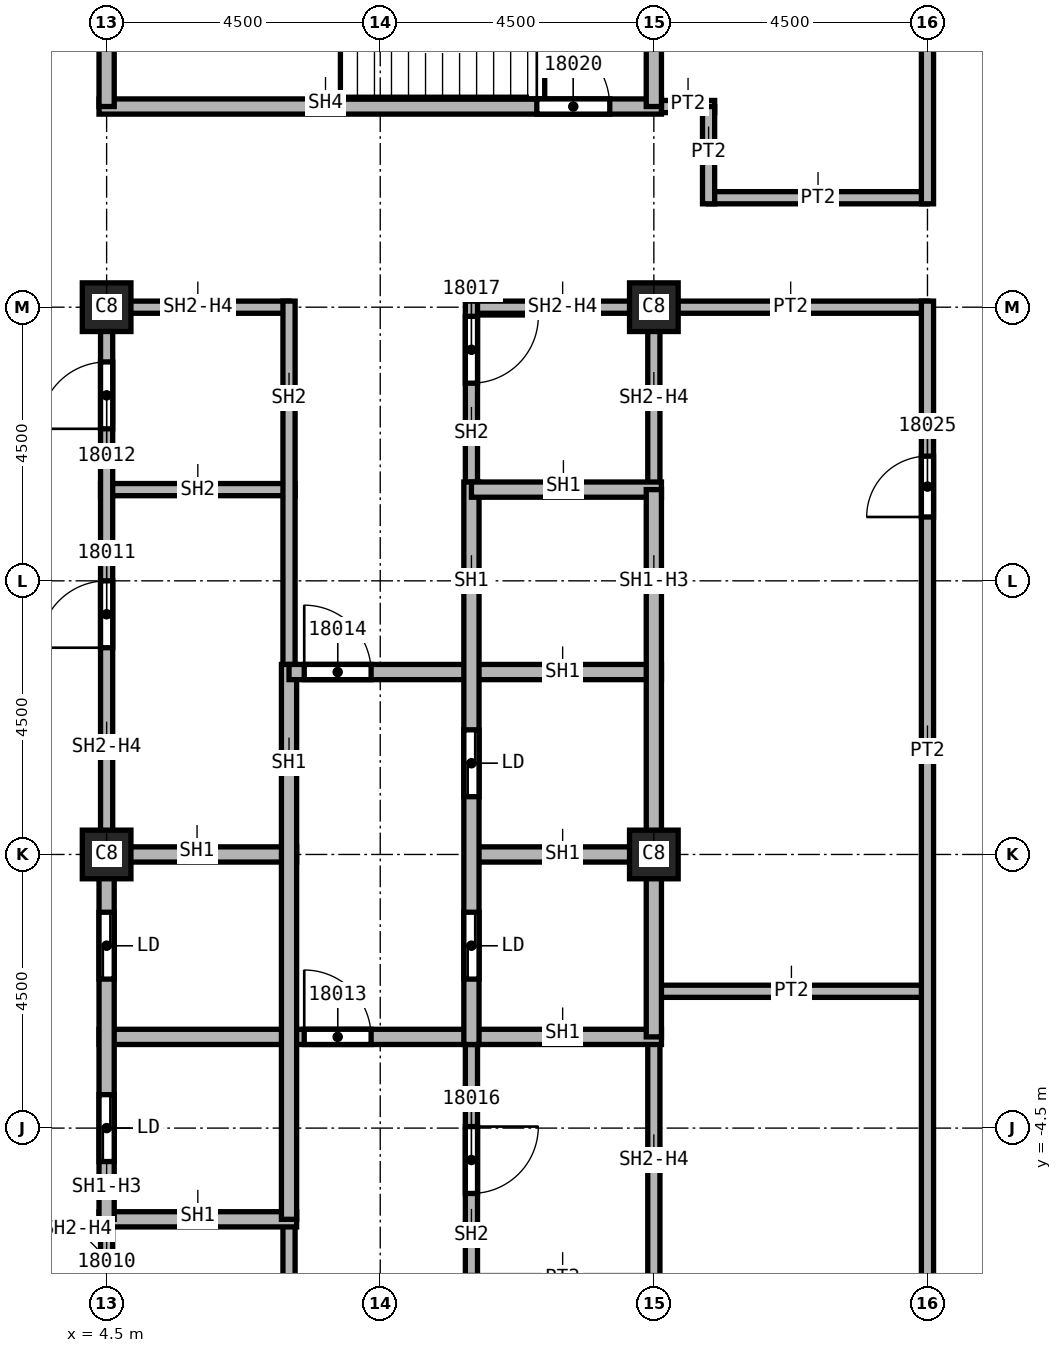
"""IFC4 building model, lengths in metres.
Left out: names, types, materials, properties, quantities, classifications, styles, units other than length and angle.
Written with IfcOpenShell. Run it as: python <this file> out.ifc"""

import sys

from ifc_helpers import new_model, si_unit, direction, frame, frame_2d, origin, origin_2d, place, context, subcontext, project, spatial, rectangle, extrude, element, fill, save


model = new_model("IFC4")
c1 = context("Model", 3, precision=1e-05, world=origin(), true_north=direction((0.0, 1.0)))
c2 = subcontext(c1, "Body", "Model", "MODEL_VIEW")
j1 = project(units=[si_unit("LENGTHUNIT", "METRE"), si_unit("PLANEANGLEUNIT", "RADIAN")], contexts=[c1])
p1 = place(None, origin())
s1 = spatial("IfcSite", under=j1, at=p1, CompositionType="ELEMENT")
p2 = place(p1, origin())
s2 = spatial("IfcBuilding", under=s1, at=p2, CompositionType="ELEMENT")
p3 = place(p2, frame((0.0, 0.0, 266.0)))
s3 = spatial("IfcBuildingStorey", under=s2, at=p3, CompositionType="ELEMENT", Elevation=266.0)
for number, where, z_axis, x_axis in (
    (1, (4.5, 0.0, 0.0), (0.0, 0.0, 1.0), (1.0, 0.0, 0.0)),
    (2, (4.5, 9.0, 0.0), (0.0, 0.0, 1.0), (1.0, 0.0, 0.0)),
    (3, (13.5, 0.0, 0.0), (0.0, 0.0, 1.0), (1.0, 0.0, 0.0)),
    (4, (13.5, 9.0, 0.0), (0.0, 0.0, 1.0), (1.0, 0.0, 0.0)),
):
    element("IfcColumn", number, at=place(p3, frame(where, z_axis=z_axis, x_axis=x_axis)), inside=s3, PredefinedType="COLUMN", context=c2, shape_type="SweptSolid", body=[
        extrude(rectangle(XDim=0.8, YDim=0.8, at=origin_2d()), origin(), (0.0, 0.0, 1.0), 3.72),
    ])
p4 = place(p3, frame((13.375, 12.3, 0.0), z_axis=(0.0, 0.0, 1.0), x_axis=(1.0, 0.0, 0.0)))
e5 = element("IfcWall", 5, at=p4, inside=s3, PredefinedType="PARTITIONING", context=c2, shape_type="SweptSolid", body=[
    extrude(rectangle(XDim=1.125, YDim=0.2, at=frame_2d((0.562, 0.0))), origin(), (0.0, 0.0, 1.0), 3.72),
])
for number, where, z_axis, x_axis in (
    (6, (13.5, -2.25, 0.0), (0.0, 0.0, 1.0), (1.0, 0.0, 0.0)),
    (7, (18.0, 9.0, 0.0), (0.0, 0.0, 1.0), (-1.0, 0.0, 0.0)),
):
    element("IfcWall", number, at=place(p3, frame(where, z_axis=z_axis, x_axis=x_axis)), inside=s3, PredefinedType="PARTITIONING", context=c2, shape_type="SweptSolid", body=[
        extrude(rectangle(XDim=4.5, YDim=0.2, at=frame_2d((2.25, 0.0))), origin(), (0.0, 0.0, 1.0), 3.72),
    ])
p5 = place(p3, frame((14.4, 10.8, 0.0), z_axis=(0.0, 0.0, 1.0), x_axis=(1.0, 0.0, 0.0)))
e8 = element("IfcWall", 8, at=p5, inside=s3, PredefinedType="PARTITIONING", context=c2, shape_type="SweptSolid", body=[
    extrude(rectangle(XDim=3.6, YDim=0.2, at=frame_2d((1.8, 0.0))), origin(), (0.0, 0.0, 1.0), 3.72),
])
p6 = place(p3, frame((14.4, 12.3, 0.0), z_axis=(0.0, 0.0, 1.0), x_axis=(0.0, -1.0, 0.0)))
e9 = element("IfcWall", 9, at=p6, inside=s3, PredefinedType="PARTITIONING", context=c2, shape_type="SweptSolid", body=[
    extrude(rectangle(XDim=1.6, YDim=0.2, at=frame_2d((0.8, 0.0))), origin(), (0.0, 0.0, 1.0), 3.72),
])
p7 = place(p3, frame((18.0, -9.1, 0.0), z_axis=(0.0, 0.0, 1.0), x_axis=(0.0, 1.0, 0.0)))
e10 = element("IfcWall", 10, at=p7, inside=s3, PredefinedType="PARTITIONING", context=c2, shape_type="SweptSolid", body=[
    extrude(rectangle(XDim=18.2, YDim=0.2, at=frame_2d((9.1, 0.0))), origin(), (0.0, 0.0, 1.0), 3.72),
])
p8 = place(p7, frame((0.25, 0.0, 0.0)))
e11 = element("IfcOpeningElement", 11, at=p8, cuts=e10, PredefinedType="OPENING", context=c2, shape_type="SweptSolid", body=[
    extrude(rectangle(XDim=1.0, YDim=2.1, at=frame_2d((0.5, 1.05))), frame((0.0, 0.1, 0.0), z_axis=(0.0, -1.0, 0.0), x_axis=(1.0, 0.0, 0.0)), (0.0, 0.0, 1.0), 0.2),
])
p9 = place(p7, frame((14.65, 0.0, 0.0)))
e12 = element("IfcOpeningElement", 12, at=p9, cuts=e10, PredefinedType="OPENING", context=c2, shape_type="SweptSolid", body=[
    extrude(rectangle(XDim=1.0, YDim=2.1, at=frame_2d((0.5, 1.05))), frame((0.0, 0.1, 0.0), z_axis=(0.0, -1.0, 0.0), x_axis=(1.0, 0.0, 0.0)), (0.0, 0.0, 1.0), 0.2),
])
p10 = place(p3, frame((18.0, 10.7, 0.0), z_axis=(0.0, 0.0, 1.0), x_axis=(0.0, 1.0, 0.0)))
e13 = element("IfcWall", 13, at=p10, inside=s3, PredefinedType="PARTITIONING", context=c2, shape_type="SweptSolid", body=[
    extrude(rectangle(XDim=11.2, YDim=0.2, at=frame_2d((5.6, 0.0))), origin(), (0.0, 0.0, 1.0), 3.72),
])
p11 = place(p10, frame((6.8, 0.0, 0.0)))
e14 = element("IfcOpeningElement", 14, at=p11, cuts=e13, PredefinedType="OPENING", context=c2, shape_type="SweptSolid", body=[
    extrude(rectangle(XDim=1.0, YDim=2.1, at=frame_2d((0.5, 1.05))), frame((0.0, 0.1, 0.0), z_axis=(0.0, -1.0, 0.0), x_axis=(1.0, 0.0, 0.0)), (0.0, 0.0, 1.0), 0.2),
])
p12 = place(p3, frame((4.4, 6.0, 0.0), z_axis=(0.0, 0.0, 1.0), x_axis=(1.0, 0.0, 0.0)))
e15 = element("IfcWall", 15, at=p12, inside=s3, PredefinedType="SOLIDWALL", context=c2, shape_type="SweptSolid", body=[
    extrude(rectangle(XDim=3.2, YDim=0.2, at=frame_2d((1.6, 0.0))), origin(), (0.0, 0.0, 1.0), 3.72),
])
p13 = place(p3, frame((4.5, -9.1, 0.0), z_axis=(0.0, 0.0, 1.0), x_axis=(0.0, 1.0, 0.0)))
e16 = element("IfcWall", 16, at=p13, inside=s3, PredefinedType="SOLIDWALL", context=c2, shape_type="SweptSolid", body=[
    extrude(rectangle(XDim=3.1, YDim=0.2, at=frame_2d((1.55, 0.0))), origin(), (0.0, 0.0, 1.0), 3.042),
])
p14 = place(p13, frame((0.85, 0.0, 0.0)))
e17 = element("IfcOpeningElement", 17, at=p14, cuts=e16, PredefinedType="OPENING", context=c2, shape_type="SweptSolid", body=[
    extrude(rectangle(XDim=1.1, YDim=2.1, at=frame_2d((0.55, 1.05))), frame((0.0, 0.1, 0.0), z_axis=(0.0, -1.0, 0.0), x_axis=(1.0, 0.0, 0.0)), (0.0, 0.0, 1.0), 0.2),
])
p15 = place(p3, frame((4.5, 0.0, 0.0), z_axis=(0.0, 0.0, 1.0), x_axis=(0.0, 1.0, 0.0)))
e18 = element("IfcWall", 18, at=p15, inside=s3, PredefinedType="SOLIDWALL", context=c2, shape_type="SweptSolid", body=[
    extrude(rectangle(XDim=9.1, YDim=0.2, at=frame_2d((4.55, 0.0))), origin(), (0.0, 0.0, 1.0), 3.042),
])
p16 = place(p15, frame((3.4, 0.0, 0.0)))
e19 = element("IfcOpeningElement", 19, at=p16, cuts=e18, PredefinedType="OPENING", context=c2, shape_type="SweptSolid", body=[
    extrude(rectangle(XDim=1.1, YDim=2.1, at=frame_2d((0.55, 1.05))), frame((0.0, 0.1, 0.0), z_axis=(0.0, -1.0, 0.0), x_axis=(1.0, 0.0, 0.0)), (0.0, 0.0, 1.0), 0.2),
])
p17 = place(p15, frame((7.0, 0.0, 0.0)))
e20 = element("IfcOpeningElement", 20, at=p17, cuts=e18, PredefinedType="OPENING", context=c2, shape_type="SweptSolid", body=[
    extrude(rectangle(XDim=1.1, YDim=2.1, at=frame_2d((0.55, 1.05))), frame((0.0, 0.1, 0.0), z_axis=(0.0, -1.0, 0.0), x_axis=(1.0, 0.0, 0.0)), (0.0, 0.0, 1.0), 0.2),
])
p18 = place(p3, frame((4.5, 9.0, 0.0), z_axis=(0.0, 0.0, 1.0), x_axis=(1.0, 0.0, 0.0)))
e21 = element("IfcWall", 21, at=p18, inside=s3, PredefinedType="SOLIDWALL", context=c2, shape_type="SweptSolid", body=[
    extrude(rectangle(XDim=3.0, YDim=0.2, at=frame_2d((1.5, 0.0))), origin(), (0.0, 0.0, 1.0), 3.042),
])
p19 = place(p3, frame((7.5, -6.0, 0.0), z_axis=(0.0, 0.0, 1.0), x_axis=(0.0, -1.0, 0.0)))
e22 = element("IfcWall", 22, at=p19, inside=s3, PredefinedType="SOLIDWALL", context=c2, shape_type="SweptSolid", body=[
    extrude(rectangle(XDim=3.1, YDim=0.2, at=frame_2d((1.55, 0.0))), origin(), (0.0, 0.0, 1.0), 3.72),
])
p20 = place(p3, frame((7.5, 9.1, 0.0), z_axis=(0.0, 0.0, 1.0), x_axis=(0.0, -1.0, 0.0)))
e23 = element("IfcWall", 23, at=p20, inside=s3, PredefinedType="SOLIDWALL", context=c2, shape_type="SweptSolid", body=[
    extrude(rectangle(XDim=6.225, YDim=0.2, at=frame_2d((3.113, 0.0))), origin(), (0.0, 0.0, 1.0), 3.72),
])
p21 = place(p3, frame((10.5, -2.875, 0.0), z_axis=(0.0, 0.0, 1.0), x_axis=(0.0, -1.0, 0.0)))
e24 = element("IfcWall", 24, at=p21, inside=s3, PredefinedType="SOLIDWALL", context=c2, shape_type="SweptSolid", body=[
    extrude(rectangle(XDim=4.2, YDim=0.2, at=frame_2d((2.1, 0.0))), origin(), (0.0, 0.0, 1.0), 3.72),
])
p22 = place(p21, frame((1.6, 0.0, 0.0)))
e25 = element("IfcOpeningElement", 25, at=p22, cuts=e24, PredefinedType="OPENING", context=c2, shape_type="SweptSolid", body=[
    extrude(rectangle(XDim=1.1, YDim=2.1, at=frame_2d((0.55, 1.05))), frame((0.0, 0.1, 0.0), z_axis=(0.0, -1.0, 0.0), x_axis=(1.0, 0.0, 0.0)), (0.0, 0.0, 1.0), 0.2),
])
p23 = place(p3, frame((10.5, 9.0, 0.0), z_axis=(0.0, 0.0, 1.0), x_axis=(1.0, 0.0, 0.0)))
e26 = element("IfcWall", 26, at=p23, inside=s3, PredefinedType="SOLIDWALL", context=c2, shape_type="SweptSolid", body=[
    extrude(rectangle(XDim=3.1, YDim=0.2, at=frame_2d((1.55, 0.0))), origin(), (0.0, 0.0, 1.0), 3.042),
])
p24 = place(p3, frame((10.5, 9.1, 0.0), z_axis=(0.0, 0.0, 1.0), x_axis=(0.0, -1.0, 0.0)))
e27 = element("IfcWall", 27, at=p24, inside=s3, PredefinedType="SOLIDWALL", context=c2, shape_type="SweptSolid", body=[
    extrude(rectangle(XDim=3.225, YDim=0.2, at=frame_2d((1.613, 0.0))), origin(), (0.0, 0.0, 1.0), 3.72),
])
p25 = place(p24, frame((0.25, 0.0, 0.0)))
e28 = element("IfcOpeningElement", 28, at=p25, cuts=e27, PredefinedType="OPENING", context=c2, shape_type="SweptSolid", body=[
    extrude(rectangle(XDim=1.1, YDim=2.1, at=frame_2d((0.55, 1.05))), frame((0.0, 0.1, 0.0), z_axis=(0.0, -1.0, 0.0), x_axis=(1.0, 0.0, 0.0)), (0.0, 0.0, 1.0), 0.2),
])
p26 = place(p3, frame((13.5, -3.0, 0.0), z_axis=(0.0, 0.0, 1.0), x_axis=(0.0, -1.0, 0.0)))
e29 = element("IfcWall", 29, at=p26, inside=s3, PredefinedType="SOLIDWALL", context=c2, shape_type="SweptSolid", body=[
    extrude(rectangle(XDim=4.0, YDim=0.2, at=frame_2d((2.0, 0.0))), origin(), (0.0, 0.0, 1.0), 3.042),
])
p27 = place(p3, frame((13.5, 9.1, 0.0), z_axis=(0.0, 0.0, 1.0), x_axis=(0.0, -1.0, 0.0)))
e30 = element("IfcWall", 30, at=p27, inside=s3, PredefinedType="SOLIDWALL", context=c2, shape_type="SweptSolid", body=[
    extrude(rectangle(XDim=3.1, YDim=0.2, at=frame_2d((1.55, 0.0))), origin(), (0.0, 0.0, 1.0), 3.042),
])
p28 = place(p3, frame((4.375, -6.0, 0.0), z_axis=(0.0, 0.0, 1.0), x_axis=(1.0, 0.0, 0.0)))
e31 = element("IfcWall", 31, at=p28, inside=s3, PredefinedType="SOLIDWALL", context=c2, shape_type="SweptSolid", body=[
    extrude(rectangle(XDim=3.25, YDim=0.25, at=frame_2d((1.625, 0.0))), origin(), (0.0, 0.0, 1.0), 3.72),
])
p29 = place(p3, frame((4.375, -3.0, 0.0), z_axis=(0.0, 0.0, 1.0), x_axis=(1.0, 0.0, 0.0)))
e32 = element("IfcWall", 32, at=p29, inside=s3, PredefinedType="SOLIDWALL", context=c2, shape_type="SweptSolid", body=[
    extrude(rectangle(XDim=9.25, YDim=0.25, at=frame_2d((4.625, 0.0))), origin(), (0.0, 0.0, 1.0), 3.72),
])
p30 = place(p29, frame((3.375, 0.0, 0.0)))
e33 = element("IfcOpeningElement", 33, at=p30, cuts=e32, PredefinedType="OPENING", context=c2, shape_type="SweptSolid", body=[
    extrude(rectangle(XDim=1.1, YDim=2.1, at=frame_2d((0.55, 1.05))), frame((0.0, 0.125, 0.0), z_axis=(0.0, -1.0, 0.0), x_axis=(1.0, 0.0, 0.0)), (0.0, 0.0, 1.0), 0.25),
])
p31 = place(p3, frame((4.375, 0.0, 0.0), z_axis=(0.0, 0.0, 1.0), x_axis=(1.0, 0.0, 0.0)))
e34 = element("IfcWall", 34, at=p31, inside=s3, PredefinedType="SOLIDWALL", context=c2, shape_type="SweptSolid", body=[
    extrude(rectangle(XDim=3.25, YDim=0.25, at=frame_2d((1.625, 0.0))), origin(), (0.0, 0.0, 1.0), 3.72),
])
p32 = place(p3, frame((4.5, -6.0, 0.0), z_axis=(0.0, 0.0, 1.0), x_axis=(0.0, 1.0, 0.0)))
e35 = element("IfcWall", 35, at=p32, inside=s3, PredefinedType="SOLIDWALL", context=c2, shape_type="SweptSolid", body=[
    extrude(rectangle(XDim=6.0, YDim=0.25, at=frame_2d((3.0, 0.0))), origin(), (0.0, 0.0, 1.0), 3.042),
])
p33 = place(p32, frame((0.95, 0.0, 0.0)))
e36 = element("IfcOpeningElement", 36, at=p33, cuts=e35, PredefinedType="OPENING", context=c2, shape_type="SweptSolid", body=[
    extrude(rectangle(XDim=1.1, YDim=2.1, at=frame_2d((0.55, 1.05))), frame((0.0, 0.125, 0.0), z_axis=(0.0, -1.0, 0.0), x_axis=(1.0, 0.0, 0.0)), (0.0, 0.0, 1.0), 0.25),
])
p34 = place(p32, frame((3.95, 0.0, 0.0)))
e37 = element("IfcOpeningElement", 37, at=p34, cuts=e35, PredefinedType="OPENING", context=c2, shape_type="SweptSolid", body=[
    extrude(rectangle(XDim=1.1, YDim=2.1, at=frame_2d((0.55, 1.05))), frame((0.0, 0.125, 0.0), z_axis=(0.0, -1.0, 0.0), x_axis=(1.0, 0.0, 0.0)), (0.0, 0.0, 1.0), 0.25),
])
p35 = place(p3, frame((7.5, 3.125, 0.0), z_axis=(0.0, 0.0, 1.0), x_axis=(0.0, -1.0, 0.0)))
e38 = element("IfcWall", 38, at=p35, inside=s3, PredefinedType="SOLIDWALL", context=c2, shape_type="SweptSolid", body=[
    extrude(rectangle(XDim=9.125, YDim=0.25, at=frame_2d((4.562, 0.0))), origin(), (0.0, 0.0, 1.0), 3.72),
])
p36 = place(p3, frame((7.5, 3.0, 0.0), z_axis=(0.0, 0.0, 1.0), x_axis=(1.0, 0.0, 0.0)))
e39 = element("IfcWall", 39, at=p36, inside=s3, PredefinedType="SOLIDWALL", context=c2, shape_type="SweptSolid", body=[
    extrude(rectangle(XDim=6.125, YDim=0.25, at=frame_2d((3.062, 0.0))), origin(), (0.0, 0.0, 1.0), 3.72),
])
p37 = place(p36, frame((0.25, 0.0, 0.0)))
e40 = element("IfcOpeningElement", 40, at=p37, cuts=e39, PredefinedType="OPENING", context=c2, shape_type="SweptSolid", body=[
    extrude(rectangle(XDim=1.1, YDim=2.1, at=frame_2d((0.55, 1.05))), frame((0.0, 0.125, 0.0), z_axis=(0.0, -1.0, 0.0), x_axis=(1.0, 0.0, 0.0)), (0.0, 0.0, 1.0), 0.25),
])
p38 = place(p3, frame((10.5, 0.0, 0.0), z_axis=(0.0, 0.0, 1.0), x_axis=(1.0, 0.0, 0.0)))
e41 = element("IfcWall", 41, at=p38, inside=s3, PredefinedType="SOLIDWALL", context=c2, shape_type="SweptSolid", body=[
    extrude(rectangle(XDim=3.125, YDim=0.25, at=frame_2d((1.562, 0.0))), origin(), (0.0, 0.0, 1.0), 3.72),
])
p39 = place(p3, frame((10.5, 6.125, 0.0), z_axis=(0.0, 0.0, 1.0), x_axis=(0.0, -1.0, 0.0)))
e42 = element("IfcWall", 42, at=p39, inside=s3, PredefinedType="SOLIDWALL", context=c2, shape_type="SweptSolid", body=[
    extrude(rectangle(XDim=9.25, YDim=0.25, at=frame_2d((4.625, 0.0))), origin(), (0.0, 0.0, 1.0), 3.72),
])
p40 = place(p39, frame((7.075, 0.0, 0.0)))
e43 = element("IfcOpeningElement", 43, at=p40, cuts=e42, PredefinedType="OPENING", context=c2, shape_type="SweptSolid", body=[
    extrude(rectangle(XDim=1.1, YDim=2.1, at=frame_2d((0.55, 1.05))), frame((0.0, 0.125, 0.0), z_axis=(0.0, -1.0, 0.0), x_axis=(1.0, 0.0, 0.0)), (0.0, 0.0, 1.0), 0.25),
])
p41 = place(p39, frame((4.075, 0.0, 0.0)))
e44 = element("IfcOpeningElement", 44, at=p41, cuts=e42, PredefinedType="OPENING", context=c2, shape_type="SweptSolid", body=[
    extrude(rectangle(XDim=1.1, YDim=2.1, at=frame_2d((0.55, 1.05))), frame((0.0, 0.125, 0.0), z_axis=(0.0, -1.0, 0.0), x_axis=(1.0, 0.0, 0.0)), (0.0, 0.0, 1.0), 0.25),
])
p42 = place(p3, frame((10.5, 6.0, 0.0), z_axis=(0.0, 0.0, 1.0), x_axis=(1.0, 0.0, 0.0)))
e45 = element("IfcWall", 45, at=p42, inside=s3, PredefinedType="SOLIDWALL", context=c2, shape_type="SweptSolid", body=[
    extrude(rectangle(XDim=3.125, YDim=0.25, at=frame_2d((1.562, 0.0))), origin(), (0.0, 0.0, 1.0), 3.72),
])
p43 = place(p3, frame((13.5, 6.0, 0.0), z_axis=(0.0, 0.0, 1.0), x_axis=(0.0, -1.0, 0.0)))
e46 = element("IfcWall", 46, at=p43, inside=s3, PredefinedType="SOLIDWALL", context=c2, shape_type="SweptSolid", body=[
    extrude(rectangle(XDim=9.0, YDim=0.25, at=frame_2d((4.5, 0.0))), origin(), (0.0, 0.0, 1.0), 3.042),
])
p44 = place(p3, frame((4.375, 12.3, 0.0), z_axis=(0.0, 0.0, 1.0), x_axis=(1.0, 0.0, 0.0)))
e47 = element("IfcWall", 47, at=p44, inside=s3, PredefinedType="SOLIDWALL", context=c2, shape_type="SweptSolid", body=[
    extrude(rectangle(XDim=9.25, YDim=0.25, at=frame_2d((4.625, 0.0))), origin(), (0.0, 0.0, 1.0), 3.72),
])
p45 = place(p44, frame((7.2, 0.0, 0.0)))
e48 = element("IfcOpeningElement", 48, at=p45, cuts=e47, PredefinedType="OPENING", context=c2, shape_type="SweptSolid", body=[
    extrude(rectangle(XDim=1.2, YDim=2.1, at=frame_2d((0.6, 1.05))), frame((0.0, 0.125, 0.0), z_axis=(0.0, -1.0, 0.0), x_axis=(1.0, 0.0, 0.0)), (0.0, 0.0, 1.0), 0.25),
])
for number, where, z_axis, x_axis in (
    (49, (4.5, 12.3, 0.0), (0.0, 0.0, 1.0), (0.0, 1.0, 0.0)),
    (50, (13.5, 16.8, 0.0), (0.0, 0.0, 1.0), (0.0, -1.0, 0.0)),
):
    element("IfcWall", number, at=place(p3, frame(where, z_axis=z_axis, x_axis=x_axis)), inside=s3, PredefinedType="SOLIDWALL", context=c2, shape_type="SweptSolid", body=[
        extrude(rectangle(XDim=4.5, YDim=0.25, at=frame_2d((2.25, 0.0))), origin(), (0.0, 0.0, 1.0), 3.72),
    ])
p46 = place(p16, origin())
e51 = element("IfcDoor", 51, at=p46, inside=s3, OperationType="SINGLE_SWING_RIGHT", PredefinedType="DOOR", context=c2, shape_type="SweptSolid", body=[
    extrude(rectangle(XDim=1.1, YDim=2.1, at=frame_2d((0.55, 1.05))), frame((0.0, 0.025, 0.0), z_axis=(0.0, -1.0, 0.0), x_axis=(1.0, 0.0, 0.0)), (0.0, 0.0, 1.0), 0.05),
])
fill(e19, e51)
p47 = place(p17, origin())
e52 = element("IfcDoor", 52, at=p47, inside=s3, OperationType="SINGLE_SWING_LEFT", PredefinedType="DOOR", context=c2, shape_type="SweptSolid", body=[
    extrude(rectangle(XDim=1.1, YDim=2.1, at=frame_2d((0.55, 1.05))), frame((0.0, 0.025, 0.0), z_axis=(0.0, -1.0, 0.0), x_axis=(1.0, 0.0, 0.0)), (0.0, 0.0, 1.0), 0.05),
])
fill(e20, e52)
p48 = place(p30, origin())
e53 = element("IfcDoor", 53, at=p48, inside=s3, OperationType="SINGLE_SWING_RIGHT", PredefinedType="DOOR", context=c2, shape_type="SweptSolid", body=[
    extrude(rectangle(XDim=1.1, YDim=2.1, at=frame_2d((0.55, 1.05))), frame((0.0, 0.025, 0.0), z_axis=(0.0, -1.0, 0.0), x_axis=(1.0, 0.0, 0.0)), (0.0, 0.0, 1.0), 0.05),
])
fill(e33, e53)
p49 = place(p37, origin())
e54 = element("IfcDoor", 54, at=p49, inside=s3, OperationType="SINGLE_SWING_LEFT", PredefinedType="DOOR", context=c2, shape_type="SweptSolid", body=[
    extrude(rectangle(XDim=1.1, YDim=2.1, at=frame_2d((0.55, 1.05))), frame((0.0, 0.025, 0.0), z_axis=(0.0, -1.0, 0.0), x_axis=(1.0, 0.0, 0.0)), (0.0, 0.0, 1.0), 0.05),
])
fill(e40, e54)
p50 = place(p22, origin())
e55 = element("IfcDoor", 55, at=p50, inside=s3, OperationType="SINGLE_SWING_LEFT", PredefinedType="DOOR", context=c2, shape_type="SweptSolid", body=[
    extrude(rectangle(XDim=1.1, YDim=2.1, at=frame_2d((0.55, 1.05))), frame((0.0, 0.025, 0.0), z_axis=(0.0, -1.0, 0.0), x_axis=(1.0, 0.0, 0.0)), (0.0, 0.0, 1.0), 0.05),
])
fill(e25, e55)
p51 = place(p25, origin())
e56 = element("IfcDoor", 56, at=p51, inside=s3, OperationType="SINGLE_SWING_RIGHT", PredefinedType="DOOR", context=c2, shape_type="SweptSolid", body=[
    extrude(rectangle(XDim=1.1, YDim=2.1, at=frame_2d((0.55, 1.05))), frame((0.0, 0.025, 0.0), z_axis=(0.0, -1.0, 0.0), x_axis=(1.0, 0.0, 0.0)), (0.0, 0.0, 1.0), 0.05),
])
fill(e28, e56)
p52 = place(p45, origin())
e57 = element("IfcDoor", 57, at=p52, inside=s3, OperationType="SINGLE_SWING_LEFT", PredefinedType="DOOR", context=c2, shape_type="SweptSolid", body=[
    extrude(rectangle(XDim=1.2, YDim=2.1, at=frame_2d((0.6, 1.05))), frame((0.0, 0.025, 0.0), z_axis=(0.0, -1.0, 0.0), x_axis=(1.0, 0.0, 0.0)), (0.0, 0.0, 1.0), 0.05),
])
fill(e48, e57)
p53 = place(p9, origin())
e58 = element("IfcDoor", 58, at=p53, inside=s3, OperationType="SINGLE_SWING_RIGHT", PredefinedType="DOOR", context=c2, shape_type="SweptSolid", body=[
    extrude(rectangle(XDim=1.0, YDim=2.1, at=frame_2d((0.5, 1.05))), frame((0.0, 0.025, 0.0), z_axis=(0.0, -1.0, 0.0), x_axis=(1.0, 0.0, 0.0)), (0.0, 0.0, 1.0), 0.05),
])
fill(e12, e58)
p54 = place(p33, origin())
e59 = element("IfcDoor", 59, at=p54, inside=s3, OperationType="SLIDING_TO_LEFT", PredefinedType="DOOR", context=c2, shape_type="SweptSolid", body=[
    extrude(rectangle(XDim=1.1, YDim=2.1, at=frame_2d((0.55, 1.05))), frame((0.0, 0.025, 0.0), z_axis=(0.0, -1.0, 0.0), x_axis=(1.0, 0.0, 0.0)), (0.0, 0.0, 1.0), 0.05),
])
fill(e36, e59)
p55 = place(p34, origin())
e60 = element("IfcDoor", 60, at=p55, inside=s3, OperationType="SLIDING_TO_LEFT", PredefinedType="DOOR", context=c2, shape_type="SweptSolid", body=[
    extrude(rectangle(XDim=1.1, YDim=2.1, at=frame_2d((0.55, 1.05))), frame((0.0, 0.025, 0.0), z_axis=(0.0, -1.0, 0.0), x_axis=(1.0, 0.0, 0.0)), (0.0, 0.0, 1.0), 0.05),
])
fill(e37, e60)
p56 = place(p40, origin())
e61 = element("IfcDoor", 61, at=p56, inside=s3, OperationType="SLIDING_TO_LEFT", PredefinedType="DOOR", context=c2, shape_type="SweptSolid", body=[
    extrude(rectangle(XDim=1.1, YDim=2.1, at=frame_2d((0.55, 1.05))), frame((0.0, 0.025, 0.0), z_axis=(0.0, -1.0, 0.0), x_axis=(1.0, 0.0, 0.0)), (0.0, 0.0, 1.0), 0.05),
])
fill(e43, e61)
p57 = place(p41, origin())
e62 = element("IfcDoor", 62, at=p57, inside=s3, OperationType="SLIDING_TO_LEFT", PredefinedType="DOOR", context=c2, shape_type="SweptSolid", body=[
    extrude(rectangle(XDim=1.1, YDim=2.1, at=frame_2d((0.55, 1.05))), frame((0.0, 0.025, 0.0), z_axis=(0.0, -1.0, 0.0), x_axis=(1.0, 0.0, 0.0)), (0.0, 0.0, 1.0), 0.05),
])
fill(e44, e62)
save(model, sys.argv[1])
